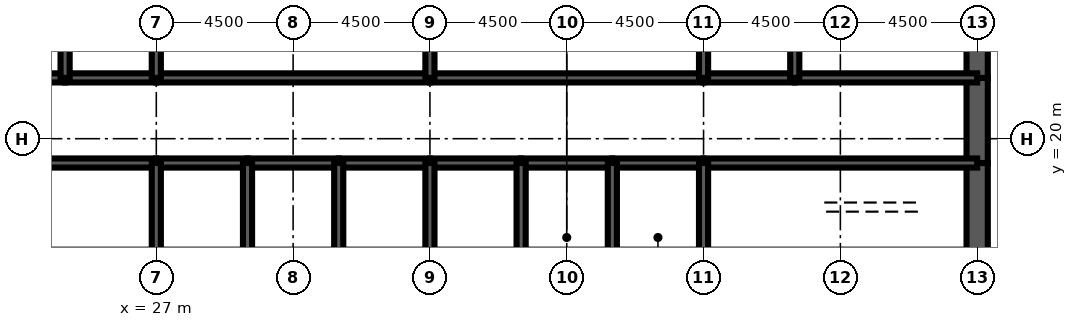
"""IFC4 building model, lengths in metres.
Left out: names, types, materials, properties, quantities, classifications, styles, units other than length and angle.
Written with IfcOpenShell. Run it as: python <this file> out.ifc"""

import sys

from ifc_helpers import new_model, si_unit, direction, frame, frame_2d, origin, place, context, subcontext, project, spatial, rectangle, extrude, element, fill, save


model = new_model("IFC4")
c1 = context("Model", 3, precision=1e-05, world=origin(), true_north=direction((0.0, 1.0)))
c2 = subcontext(c1, "Body", "Model", "MODEL_VIEW")
j1 = project(units=[si_unit("LENGTHUNIT", "METRE"), si_unit("PLANEANGLEUNIT", "RADIAN")], contexts=[c1])
p1 = place(None, origin())
s1 = spatial("IfcSite", under=j1, at=p1, CompositionType="ELEMENT")
p2 = place(p1, origin())
s2 = spatial("IfcBuilding", under=s1, at=p2, CompositionType="ELEMENT")
p3 = place(p2, frame((0.0, 0.0, 321.5)))
s3 = spatial("IfcBuildingStorey", under=s2, at=p3, CompositionType="ELEMENT", Elevation=321.5)
p4 = place(p3, frame((54.0, 16.0, 0.0), z_axis=(0.0, 0.0, 1.0), x_axis=(0.0, 1.0, 0.0)))
e1 = element("IfcWall", 1, at=p4, inside=s3, PredefinedType="SHEAR", context=c2, shape_type="SweptSolid", body=[
    extrude(rectangle(XDim=3.2, YDim=0.7, at=frame_2d((1.6, 0.0))), origin(), (0.0, 0.0, 1.0), 4.2),
])
p5 = place(p3, frame((54.0, 19.2, 0.0), z_axis=(0.0, 0.0, 1.0), x_axis=(0.0, 1.0, 0.0)))
e2 = element("IfcWall", 2, at=p5, inside=s3, PredefinedType="SHEAR", context=c2, shape_type="SweptSolid", body=[
    extrude(rectangle(XDim=2.8, YDim=0.7, at=frame_2d((1.4, 0.0))), origin(), (0.0, 0.0, 1.0), 4.2),
])
p6 = place(p5, frame((0.4, 0.0, 0.0)))
e3 = element("IfcOpeningElement", 3, at=p6, cuts=e2, PredefinedType="OPENING", context=c2, shape_type="SweptSolid", body=[
    extrude(rectangle(XDim=1.8, YDim=2.1, at=frame_2d((0.9, 1.05))), frame((0.0, 0.36, 0.0), z_axis=(0.0, -1.0, 0.0), x_axis=(1.0, 0.0, 0.0)), (0.0, 0.0, 1.0), 0.72),
])
p7 = place(p3, frame((54.0, 22.0, 0.0), z_axis=(0.0, 0.0, 1.0), x_axis=(0.0, 1.0, 0.0)))
e4 = element("IfcWall", 4, at=p7, inside=s3, PredefinedType="SHEAR", context=c2, shape_type="SweptSolid", body=[
    extrude(rectangle(XDim=4.0, YDim=0.7, at=frame_2d((2.0, 0.0))), origin(), (0.0, 0.0, 1.0), 4.2),
])
p8 = place(p3, frame((18.0, 19.2, 0.0), z_axis=(0.0, 0.0, 1.0), x_axis=(1.0, 0.0, 0.0)))
e5 = element("IfcWall", 5, at=p8, inside=s3, PredefinedType="SOLIDWALL", context=c2, shape_type="SweptSolid", body=[
    extrude(rectangle(XDim=9.0, YDim=0.3, at=frame_2d((4.5, 0.0))), origin(), (0.0, 0.0, 1.0), 4.2),
])
p9 = place(p8, frame((0.65, 0.0, 0.0)))
e6 = element("IfcOpeningElement", 6, at=p9, cuts=e5, PredefinedType="OPENING", context=c2, shape_type="SweptSolid", body=[
    extrude(rectangle(XDim=1.0, YDim=2.1, at=frame_2d((0.5, 1.05))), frame((0.0, 0.16, 0.0), z_axis=(0.0, -1.0, 0.0), x_axis=(1.0, 0.0, 0.0)), (0.0, 0.0, 1.0), 0.32),
])
p10 = place(p3, frame((27.0, 19.2, 0.0), z_axis=(0.0, 0.0, 1.0), x_axis=(1.0, 0.0, 0.0)))
e7 = element("IfcWall", 7, at=p10, inside=s3, PredefinedType="SOLIDWALL", context=c2, shape_type="SweptSolid", body=[
    extrude(rectangle(XDim=3.0, YDim=0.3, at=frame_2d((1.5, 0.0))), origin(), (0.0, 0.0, 1.0), 4.2),
])
p11 = place(p10, frame((0.95, 0.0, 0.0)))
e8 = element("IfcOpeningElement", 8, at=p11, cuts=e7, PredefinedType="OPENING", context=c2, shape_type="SweptSolid", body=[
    extrude(rectangle(XDim=1.1, YDim=2.2, at=frame_2d((0.55, 1.1))), frame((0.0, 0.16, 0.0), z_axis=(0.0, -1.0, 0.0), x_axis=(1.0, 0.0, 0.0)), (0.0, 0.0, 1.0), 0.32),
])
p12 = place(p3, frame((30.0, 19.2, 0.0), z_axis=(0.0, 0.0, 1.0), x_axis=(1.0, 0.0, 0.0)))
e9 = element("IfcWall", 9, at=p12, inside=s3, PredefinedType="SOLIDWALL", context=c2, shape_type="SweptSolid", body=[
    extrude(rectangle(XDim=3.0, YDim=0.3, at=frame_2d((1.5, 0.0))), origin(), (0.0, 0.0, 1.0), 4.2),
])
p13 = place(p12, frame((0.95, 0.0, 0.0)))
e10 = element("IfcOpeningElement", 10, at=p13, cuts=e9, PredefinedType="OPENING", context=c2, shape_type="SweptSolid", body=[
    extrude(rectangle(XDim=1.1, YDim=2.2, at=frame_2d((0.55, 1.1))), frame((0.0, 0.16, 0.0), z_axis=(0.0, -1.0, 0.0), x_axis=(1.0, 0.0, 0.0)), (0.0, 0.0, 1.0), 0.32),
])
p14 = place(p3, frame((33.0, 19.2, 0.0), z_axis=(0.0, 0.0, 1.0), x_axis=(1.0, 0.0, 0.0)))
e11 = element("IfcWall", 11, at=p14, inside=s3, PredefinedType="SOLIDWALL", context=c2, shape_type="SweptSolid", body=[
    extrude(rectangle(XDim=3.0, YDim=0.3, at=frame_2d((1.5, 0.0))), origin(), (0.0, 0.0, 1.0), 4.2),
])
p15 = place(p14, frame((0.95, 0.0, 0.0)))
e12 = element("IfcOpeningElement", 12, at=p15, cuts=e11, PredefinedType="OPENING", context=c2, shape_type="SweptSolid", body=[
    extrude(rectangle(XDim=1.1, YDim=2.2, at=frame_2d((0.55, 1.1))), frame((0.0, 0.16, 0.0), z_axis=(0.0, -1.0, 0.0), x_axis=(1.0, 0.0, 0.0)), (0.0, 0.0, 1.0), 0.32),
])
p16 = place(p3, frame((36.0, 19.2, 0.0), z_axis=(0.0, 0.0, 1.0), x_axis=(1.0, 0.0, 0.0)))
e13 = element("IfcWall", 13, at=p16, inside=s3, PredefinedType="SOLIDWALL", context=c2, shape_type="SweptSolid", body=[
    extrude(rectangle(XDim=3.0, YDim=0.3, at=frame_2d((1.5, 0.0))), origin(), (0.0, 0.0, 1.0), 4.2),
])
p17 = place(p16, frame((0.95, 0.0, 0.0)))
e14 = element("IfcOpeningElement", 14, at=p17, cuts=e13, PredefinedType="OPENING", context=c2, shape_type="SweptSolid", body=[
    extrude(rectangle(XDim=1.1, YDim=2.2, at=frame_2d((0.55, 1.1))), frame((0.0, 0.16, 0.0), z_axis=(0.0, -1.0, 0.0), x_axis=(1.0, 0.0, 0.0)), (0.0, 0.0, 1.0), 0.32),
])
p18 = place(p3, frame((39.0, 19.2, 0.0), z_axis=(0.0, 0.0, 1.0), x_axis=(1.0, 0.0, 0.0)))
e15 = element("IfcWall", 15, at=p18, inside=s3, PredefinedType="SOLIDWALL", context=c2, shape_type="SweptSolid", body=[
    extrude(rectangle(XDim=3.0, YDim=0.3, at=frame_2d((1.5, 0.0))), origin(), (0.0, 0.0, 1.0), 4.2),
])
p19 = place(p18, frame((1.0, 0.0, 0.0)))
e16 = element("IfcOpeningElement", 16, at=p19, cuts=e15, PredefinedType="OPENING", context=c2, shape_type="SweptSolid", body=[
    extrude(rectangle(XDim=1.0, YDim=2.1, at=frame_2d((0.5, 1.05))), frame((0.0, 0.16, 0.0), z_axis=(0.0, -1.0, 0.0), x_axis=(1.0, 0.0, 0.0)), (0.0, 0.0, 1.0), 0.32),
])
p20 = place(p3, frame((42.0, 19.2, 0.0), z_axis=(0.0, 0.0, 1.0), x_axis=(1.0, 0.0, 0.0)))
e17 = element("IfcWall", 17, at=p20, inside=s3, PredefinedType="SOLIDWALL", context=c2, shape_type="SweptSolid", body=[
    extrude(rectangle(XDim=3.0, YDim=0.3, at=frame_2d((1.5, 0.0))), origin(), (0.0, 0.0, 1.0), 4.2),
])
p21 = place(p20, frame((1.0, 0.0, 0.0)))
e18 = element("IfcOpeningElement", 18, at=p21, cuts=e17, PredefinedType="OPENING", context=c2, shape_type="SweptSolid", body=[
    extrude(rectangle(XDim=1.0, YDim=2.1, at=frame_2d((0.5, 1.05))), frame((0.0, 0.16, 0.0), z_axis=(0.0, -1.0, 0.0), x_axis=(1.0, 0.0, 0.0)), (0.0, 0.0, 1.0), 0.32),
])
p22 = place(p3, frame((45.0, 19.2, 0.0), z_axis=(0.0, 0.0, 1.0), x_axis=(1.0, 0.0, 0.0)))
e19 = element("IfcWall", 19, at=p22, inside=s3, PredefinedType="SOLIDWALL", context=c2, shape_type="SweptSolid", body=[
    extrude(rectangle(XDim=9.0, YDim=0.3, at=frame_2d((4.5, 0.0))), origin(), (0.0, 0.0, 1.0), 4.2),
])
p23 = place(p22, frame((7.35, 0.0, 0.0)))
e20 = element("IfcOpeningElement", 20, at=p23, cuts=e19, PredefinedType="OPENING", context=c2, shape_type="SweptSolid", body=[
    extrude(rectangle(XDim=1.0, YDim=2.1, at=frame_2d((0.5, 1.05))), frame((0.0, 0.16, 0.0), z_axis=(0.0, -1.0, 0.0), x_axis=(1.0, 0.0, 0.0)), (0.0, 0.0, 1.0), 0.32),
])
p24 = place(p3, frame((18.0, 22.0, 0.0), z_axis=(0.0, 0.0, 1.0), x_axis=(1.0, 0.0, 0.0)))
e21 = element("IfcWall", 21, at=p24, inside=s3, PredefinedType="SOLIDWALL", context=c2, shape_type="SweptSolid", body=[
    extrude(rectangle(XDim=6.0, YDim=0.3, at=frame_2d((3.0, 0.0))), origin(), (0.0, 0.0, 1.0), 4.2),
])
p25 = place(p24, frame((2.0, 0.0, 0.0)))
e22 = element("IfcOpeningElement", 22, at=p25, cuts=e21, PredefinedType="OPENING", context=c2, shape_type="SweptSolid", body=[
    extrude(rectangle(XDim=1.0, YDim=2.1, at=frame_2d((0.5, 1.05))), frame((0.0, 0.16, 0.0), z_axis=(0.0, -1.0, 0.0), x_axis=(1.0, 0.0, 0.0)), (0.0, 0.0, 1.0), 0.32),
])
p26 = place(p3, frame((24.0, 22.0, 0.0), z_axis=(0.0, 0.0, 1.0), x_axis=(1.0, 0.0, 0.0)))
e23 = element("IfcWall", 23, at=p26, inside=s3, PredefinedType="SOLIDWALL", context=c2, shape_type="SweptSolid", body=[
    extrude(rectangle(XDim=3.0, YDim=0.3, at=frame_2d((1.5, 0.0))), origin(), (0.0, 0.0, 1.0), 4.2),
])
p27 = place(p26, frame((1.0, 0.0, 0.0)))
e24 = element("IfcOpeningElement", 24, at=p27, cuts=e23, PredefinedType="OPENING", context=c2, shape_type="SweptSolid", body=[
    extrude(rectangle(XDim=1.0, YDim=2.1, at=frame_2d((0.5, 1.05))), frame((0.0, 0.16, 0.0), z_axis=(0.0, -1.0, 0.0), x_axis=(1.0, 0.0, 0.0)), (0.0, 0.0, 1.0), 0.32),
])
p28 = place(p3, frame((27.0, 22.0, 0.0), z_axis=(0.0, 0.0, 1.0), x_axis=(1.0, 0.0, 0.0)))
e25 = element("IfcWall", 25, at=p28, inside=s3, PredefinedType="SOLIDWALL", context=c2, shape_type="SweptSolid", body=[
    extrude(rectangle(XDim=9.0, YDim=0.3, at=frame_2d((4.5, 0.0))), origin(), (0.0, 0.0, 1.0), 4.2),
])
p29 = place(p28, frame((4.0, 0.0, 0.0)))
e26 = element("IfcOpeningElement", 26, at=p29, cuts=e25, PredefinedType="OPENING", context=c2, shape_type="SweptSolid", body=[
    extrude(rectangle(XDim=1.0, YDim=2.1, at=frame_2d((0.5, 1.05))), frame((0.0, 0.16, 0.0), z_axis=(0.0, -1.0, 0.0), x_axis=(1.0, 0.0, 0.0)), (0.0, 0.0, 1.0), 0.32),
])
p30 = place(p3, frame((36.0, 22.0, 0.0), z_axis=(0.0, 0.0, 1.0), x_axis=(1.0, 0.0, 0.0)))
e27 = element("IfcWall", 27, at=p30, inside=s3, PredefinedType="SOLIDWALL", context=c2, shape_type="SweptSolid", body=[
    extrude(rectangle(XDim=9.0, YDim=0.3, at=frame_2d((4.5, 0.0))), origin(), (0.0, 0.0, 1.0), 4.2),
])
p31 = place(p30, frame((4.0, 0.0, 0.0)))
e28 = element("IfcOpeningElement", 28, at=p31, cuts=e27, PredefinedType="OPENING", context=c2, shape_type="SweptSolid", body=[
    extrude(rectangle(XDim=1.0, YDim=2.1, at=frame_2d((0.5, 1.05))), frame((0.0, 0.16, 0.0), z_axis=(0.0, -1.0, 0.0), x_axis=(1.0, 0.0, 0.0)), (0.0, 0.0, 1.0), 0.32),
])
p32 = place(p3, frame((45.0, 22.0, 0.0), z_axis=(0.0, 0.0, 1.0), x_axis=(1.0, 0.0, 0.0)))
e29 = element("IfcWall", 29, at=p32, inside=s3, PredefinedType="SOLIDWALL", context=c2, shape_type="SweptSolid", body=[
    extrude(rectangle(XDim=3.0, YDim=0.3, at=frame_2d((1.5, 0.0))), origin(), (0.0, 0.0, 1.0), 4.2),
])
p33 = place(p32, frame((1.0, 0.0, 0.0)))
e30 = element("IfcOpeningElement", 30, at=p33, cuts=e29, PredefinedType="OPENING", context=c2, shape_type="SweptSolid", body=[
    extrude(rectangle(XDim=1.0, YDim=2.1, at=frame_2d((0.5, 1.05))), frame((0.0, 0.16, 0.0), z_axis=(0.0, -1.0, 0.0), x_axis=(1.0, 0.0, 0.0)), (0.0, 0.0, 1.0), 0.32),
])
p34 = place(p3, frame((48.0, 22.0, 0.0), z_axis=(0.0, 0.0, 1.0), x_axis=(1.0, 0.0, 0.0)))
e31 = element("IfcWall", 31, at=p34, inside=s3, PredefinedType="SOLIDWALL", context=c2, shape_type="SweptSolid", body=[
    extrude(rectangle(XDim=6.0, YDim=0.3, at=frame_2d((3.0, 0.0))), origin(), (0.0, 0.0, 1.0), 4.2),
])
p35 = place(p34, frame((2.0, 0.0, 0.0)))
e32 = element("IfcOpeningElement", 32, at=p35, cuts=e31, PredefinedType="OPENING", context=c2, shape_type="SweptSolid", body=[
    extrude(rectangle(XDim=1.0, YDim=2.1, at=frame_2d((0.5, 1.05))), frame((0.0, 0.16, 0.0), z_axis=(0.0, -1.0, 0.0), x_axis=(1.0, 0.0, 0.0)), (0.0, 0.0, 1.0), 0.32),
])
p36 = place(p34, frame((4.1, 0.0, 0.0)))
e33 = element("IfcOpeningElement", 33, at=p36, cuts=e31, PredefinedType="OPENING", context=c2, shape_type="SweptSolid", body=[
    extrude(rectangle(XDim=1.0, YDim=2.1, at=frame_2d((0.5, 1.05))), frame((0.0, 0.16, 0.0), z_axis=(0.0, -1.0, 0.0), x_axis=(1.0, 0.0, 0.0)), (0.0, 0.0, 1.0), 0.32),
])
for number, where, z_axis, x_axis in (
    (34, (27.0, 16.0, 0.0), (0.0, 0.0, 1.0), (0.0, 1.0, 0.0)),
    (35, (30.0, 16.0, 0.0), (0.0, 0.0, 1.0), (0.0, 1.0, 0.0)),
    (36, (33.0, 16.0, 0.0), (0.0, 0.0, 1.0), (0.0, 1.0, 0.0)),
    (37, (36.0, 16.0, 0.0), (0.0, 0.0, 1.0), (0.0, 1.0, 0.0)),
    (38, (39.0, 16.0, 0.0), (0.0, 0.0, 1.0), (0.0, 1.0, 0.0)),
    (39, (42.0, 16.0, 0.0), (0.0, 0.0, 1.0), (0.0, 1.0, 0.0)),
    (40, (45.0, 16.0, 0.0), (0.0, 0.0, 1.0), (0.0, 1.0, 0.0)),
):
    element("IfcWall", number, at=place(p3, frame(where, z_axis=z_axis, x_axis=x_axis)), inside=s3, PredefinedType="SOLIDWALL", context=c2, shape_type="SweptSolid", body=[
        extrude(rectangle(XDim=3.2, YDim=0.3, at=frame_2d((1.6, 0.0))), origin(), (0.0, 0.0, 1.0), 4.2),
    ])
for number, where, z_axis, x_axis in (
    (41, (24.0, 22.0, 0.0), (0.0, 0.0, 1.0), (0.0, 1.0, 0.0)),
    (42, (27.0, 22.0, 0.0), (0.0, 0.0, 1.0), (0.0, 1.0, 0.0)),
    (43, (36.0, 22.0, 0.0), (0.0, 0.0, 1.0), (0.0, 1.0, 0.0)),
    (44, (45.0, 22.0, 0.0), (0.0, 0.0, 1.0), (0.0, 1.0, 0.0)),
    (45, (48.0, 22.0, 0.0), (0.0, 0.0, 1.0), (0.0, 1.0, 0.0)),
):
    element("IfcWall", number, at=place(p3, frame(where, z_axis=z_axis, x_axis=x_axis)), inside=s3, PredefinedType="SOLIDWALL", context=c2, shape_type="SweptSolid", body=[
        extrude(rectangle(XDim=4.0, YDim=0.3, at=frame_2d((2.0, 0.0))), origin(), (0.0, 0.0, 1.0), 4.2),
    ])
p37 = place(p3, frame((39.15, 17.3, 0.0), z_axis=(0.0, 0.0, 1.0), x_axis=(1.0, 0.0, 0.0)))
e46 = element("IfcWall", 46, at=p37, inside=s3, PredefinedType="SOLIDWALL", context=c2, shape_type="SweptSolid", body=[
    extrude(rectangle(XDim=2.7, YDim=0.3, at=frame_2d((1.35, 0.0))), origin(), (0.0, 0.0, 1.0), 4.04),
])
p38 = place(p37, frame((0.85, 0.0, 0.0)))
e47 = element("IfcOpeningElement", 47, at=p38, cuts=e46, PredefinedType="OPENING", context=c2, shape_type="SweptSolid", body=[
    extrude(rectangle(XDim=1.0, YDim=2.1, at=frame_2d((0.5, 1.05))), frame((0.0, 0.16, 0.0), z_axis=(0.0, -1.0, 0.0), x_axis=(1.0, 0.0, 0.0)), (0.0, 0.0, 1.0), 0.32),
])
p39 = place(p3, frame((42.15, 17.3, 0.0), z_axis=(0.0, 0.0, 1.0), x_axis=(1.0, 0.0, 0.0)))
e48 = element("IfcWall", 48, at=p39, inside=s3, PredefinedType="SOLIDWALL", context=c2, shape_type="SweptSolid", body=[
    extrude(rectangle(XDim=2.7, YDim=0.3, at=frame_2d((1.35, 0.0))), origin(), (0.0, 0.0, 1.0), 4.04),
])
p40 = place(p39, frame((0.85, 0.0, 0.0)))
e49 = element("IfcOpeningElement", 49, at=p40, cuts=e48, PredefinedType="OPENING", context=c2, shape_type="SweptSolid", body=[
    extrude(rectangle(XDim=1.0, YDim=2.1, at=frame_2d((0.5, 1.05))), frame((0.0, 0.16, 0.0), z_axis=(0.0, -1.0, 0.0), x_axis=(1.0, 0.0, 0.0)), (0.0, 0.0, 1.0), 0.32),
])
p41 = place(p3, frame((38.5, 22.15, 0.0), z_axis=(0.0, 0.0, 1.0), x_axis=(0.0, 1.0, 0.0)))
e50 = element("IfcWall", 50, at=p41, inside=s3, PredefinedType="PARTITIONING", context=c2, shape_type="SweptSolid", body=[
    extrude(rectangle(XDim=3.7, YDim=0.15, at=frame_2d((1.85, 0.0))), origin(), (0.0, 0.0, 1.0), 3.0),
])
p42 = place(p41, frame((2.2, 0.0, 0.0)))
e51 = element("IfcOpeningElement", 51, at=p42, cuts=e50, PredefinedType="OPENING", context=c2, shape_type="SweptSolid", body=[
    extrude(rectangle(XDim=1.0, YDim=2.1, at=frame_2d((0.5, 1.05))), frame((0.0, 0.085, 0.0), z_axis=(0.0, -1.0, 0.0), x_axis=(1.0, 0.0, 0.0)), (0.0, 0.0, 1.0), 0.17),
])
p43 = place(p3, frame((51.475, 22.15, 0.0), z_axis=(0.0, 0.0, 1.0), x_axis=(0.0, 1.0, 0.0)))
e52 = element("IfcWall", 52, at=p43, inside=s3, PredefinedType="PARTITIONING", context=c2, shape_type="SweptSolid", body=[
    extrude(rectangle(XDim=3.7, YDim=0.15, at=frame_2d((1.85, 0.0))), origin(), (0.0, 0.0, 1.0), 3.0),
])
p44 = place(p3, frame((24.5, 19.35, 0.0), z_axis=(0.0, 0.0, 1.0), x_axis=(0.0, 1.0, 0.0)))
e53 = element("IfcWall", 53, at=p44, inside=s3, PredefinedType="PARTITIONING", context=c2, shape_type="SweptSolid", body=[
    extrude(rectangle(XDim=2.5, YDim=0.15, at=frame_2d((1.25, 0.0))), origin(), (0.0, 0.0, 1.0), 3.0),
])
p45 = place(p44, frame((1.15, 0.0, 0.0)))
e54 = element("IfcOpeningElement", 54, at=p45, cuts=e53, PredefinedType="OPENING", context=c2, shape_type="SweptSolid", body=[
    extrude(rectangle(XDim=1.0, YDim=2.1, at=frame_2d((0.5, 1.05))), frame((0.0, 0.085, 0.0), z_axis=(0.0, -1.0, 0.0), x_axis=(1.0, 0.0, 0.0)), (0.0, 0.0, 1.0), 0.17),
])
p46 = place(p38, origin())
e55 = element("IfcDoor", 55, at=p46, inside=s3, OperationType="SINGLE_SWING_LEFT", PredefinedType="DOOR", context=c2, shape_type="SweptSolid", body=[
    extrude(rectangle(XDim=1.0, YDim=2.1, at=frame_2d((0.5, 1.05))), frame((0.0, 0.025, 0.0), z_axis=(0.0, -1.0, 0.0), x_axis=(1.0, 0.0, 0.0)), (0.0, 0.0, 1.0), 0.05),
])
fill(e47, e55)
p47 = place(p40, origin())
e56 = element("IfcDoor", 56, at=p47, inside=s3, OperationType="SINGLE_SWING_LEFT", PredefinedType="DOOR", context=c2, shape_type="SweptSolid", body=[
    extrude(rectangle(XDim=1.0, YDim=2.1, at=frame_2d((0.5, 1.05))), frame((0.0, 0.025, 0.0), z_axis=(0.0, -1.0, 0.0), x_axis=(1.0, 0.0, 0.0)), (0.0, 0.0, 1.0), 0.05),
])
fill(e49, e56)
p48 = place(p45, origin())
e57 = element("IfcDoor", 57, at=p48, inside=s3, OperationType="SINGLE_SWING_RIGHT", PredefinedType="DOOR", context=c2, shape_type="SweptSolid", body=[
    extrude(rectangle(XDim=1.0, YDim=2.1, at=frame_2d((0.5, 1.05))), frame((0.0, 0.025, 0.0), z_axis=(0.0, -1.0, 0.0), x_axis=(1.0, 0.0, 0.0)), (0.0, 0.0, 1.0), 0.05),
])
fill(e54, e57)
p49 = place(p11, origin())
e58 = element("IfcDoor", 58, at=p49, inside=s3, OperationType="DOUBLE_DOOR_SLIDING", PredefinedType="USERDEFINED", context=c2, shape_type="SweptSolid", body=[
    extrude(rectangle(XDim=1.1, YDim=2.2, at=frame_2d((0.55, 1.1))), frame((0.0, 0.025, 0.0), z_axis=(0.0, -1.0, 0.0), x_axis=(1.0, 0.0, 0.0)), (0.0, 0.0, 1.0), 0.05),
])
fill(e8, e58)
p50 = place(p13, origin())
e59 = element("IfcDoor", 59, at=p50, inside=s3, OperationType="DOUBLE_DOOR_SLIDING", PredefinedType="USERDEFINED", context=c2, shape_type="SweptSolid", body=[
    extrude(rectangle(XDim=1.1, YDim=2.2, at=frame_2d((0.55, 1.1))), frame((0.0, 0.025, 0.0), z_axis=(0.0, -1.0, 0.0), x_axis=(1.0, 0.0, 0.0)), (0.0, 0.0, 1.0), 0.05),
])
fill(e10, e59)
p51 = place(p15, origin())
e60 = element("IfcDoor", 60, at=p51, inside=s3, OperationType="DOUBLE_DOOR_SLIDING", PredefinedType="USERDEFINED", context=c2, shape_type="SweptSolid", body=[
    extrude(rectangle(XDim=1.1, YDim=2.2, at=frame_2d((0.55, 1.1))), frame((0.0, 0.025, 0.0), z_axis=(0.0, -1.0, 0.0), x_axis=(1.0, 0.0, 0.0)), (0.0, 0.0, 1.0), 0.05),
])
fill(e12, e60)
p52 = place(p17, origin())
e61 = element("IfcDoor", 61, at=p52, inside=s3, OperationType="DOUBLE_DOOR_SLIDING", PredefinedType="USERDEFINED", context=c2, shape_type="SweptSolid", body=[
    extrude(rectangle(XDim=1.1, YDim=2.2, at=frame_2d((0.55, 1.1))), frame((0.0, 0.025, 0.0), z_axis=(0.0, -1.0, 0.0), x_axis=(1.0, 0.0, 0.0)), (0.0, 0.0, 1.0), 0.05),
])
fill(e14, e61)
p53 = place(p23, origin())
e62 = element("IfcDoor", 62, at=p53, inside=s3, OperationType="SINGLE_SWING_RIGHT", PredefinedType="DOOR", context=c2, shape_type="SweptSolid", body=[
    extrude(rectangle(XDim=1.0, YDim=2.1, at=frame_2d((0.5, 1.05))), frame((0.0, 0.025, 0.0), z_axis=(0.0, -1.0, 0.0), x_axis=(1.0, 0.0, 0.0)), (0.0, 0.0, 1.0), 0.05),
])
fill(e20, e62)
p54 = place(p6, origin())
e63 = element("IfcDoor", 63, at=p54, inside=s3, OperationType="SINGLE_SWING_LEFT", PredefinedType="DOOR", context=c2, shape_type="SweptSolid", body=[
    extrude(rectangle(XDim=1.8, YDim=2.1, at=frame_2d((0.9, 1.05))), frame((0.0, 0.35, 0.0), z_axis=(0.0, -1.0, 0.0), x_axis=(1.0, 0.0, 0.0)), (0.0, 0.0, 1.0), 0.699),
])
fill(e3, e63)
p55 = place(p27, origin())
e64 = element("IfcDoor", 64, at=p55, inside=s3, OperationType="SINGLE_SWING_LEFT", PredefinedType="DOOR", context=c2, shape_type="SweptSolid", body=[
    extrude(rectangle(XDim=1.0, YDim=2.1, at=frame_2d((0.5, 1.05))), frame((0.0, 0.025, 0.0), z_axis=(0.0, -1.0, 0.0), x_axis=(1.0, 0.0, 0.0)), (0.0, 0.0, 1.0), 0.05),
])
fill(e24, e64)
p56 = place(p29, origin())
e65 = element("IfcDoor", 65, at=p56, inside=s3, OperationType="SINGLE_SWING_LEFT", PredefinedType="DOOR", context=c2, shape_type="SweptSolid", body=[
    extrude(rectangle(XDim=1.0, YDim=2.1, at=frame_2d((0.5, 1.05))), frame((0.0, 0.025, 0.0), z_axis=(0.0, -1.0, 0.0), x_axis=(1.0, 0.0, 0.0)), (0.0, 0.0, 1.0), 0.05),
])
fill(e26, e65)
p57 = place(p31, origin())
e66 = element("IfcDoor", 66, at=p57, inside=s3, OperationType="SINGLE_SWING_LEFT", PredefinedType="DOOR", context=c2, shape_type="SweptSolid", body=[
    extrude(rectangle(XDim=1.0, YDim=2.1, at=frame_2d((0.5, 1.05))), frame((0.0, 0.025, 0.0), z_axis=(0.0, -1.0, 0.0), x_axis=(1.0, 0.0, 0.0)), (0.0, 0.0, 1.0), 0.05),
])
fill(e28, e66)
p58 = place(p33, origin())
e67 = element("IfcDoor", 67, at=p58, inside=s3, OperationType="SINGLE_SWING_LEFT", PredefinedType="DOOR", context=c2, shape_type="SweptSolid", body=[
    extrude(rectangle(XDim=1.0, YDim=2.1, at=frame_2d((0.5, 1.05))), frame((0.0, 0.025, 0.0), z_axis=(0.0, -1.0, 0.0), x_axis=(1.0, 0.0, 0.0)), (0.0, 0.0, 1.0), 0.05),
])
fill(e30, e67)
p59 = place(p35, origin())
e68 = element("IfcDoor", 68, at=p59, inside=s3, OperationType="SINGLE_SWING_LEFT", PredefinedType="DOOR", context=c2, shape_type="SweptSolid", body=[
    extrude(rectangle(XDim=1.0, YDim=2.1, at=frame_2d((0.5, 1.05))), frame((0.0, 0.025, 0.0), z_axis=(0.0, -1.0, 0.0), x_axis=(1.0, 0.0, 0.0)), (0.0, 0.0, 1.0), 0.05),
])
fill(e32, e68)
p60 = place(p36, origin())
e69 = element("IfcDoor", 69, at=p60, inside=s3, OperationType="SINGLE_SWING_RIGHT", PredefinedType="DOOR", context=c2, shape_type="SweptSolid", body=[
    extrude(rectangle(XDim=1.0, YDim=2.1, at=frame_2d((0.5, 1.05))), frame((0.0, 0.025, 0.0), z_axis=(0.0, -1.0, 0.0), x_axis=(1.0, 0.0, 0.0)), (0.0, 0.0, 1.0), 0.05),
])
fill(e33, e69)
p61 = place(p19, origin())
e70 = element("IfcDoor", 70, at=p61, inside=s3, OperationType="SINGLE_SWING_LEFT", PredefinedType="DOOR", context=c2, shape_type="SweptSolid", body=[
    extrude(rectangle(XDim=1.0, YDim=2.1, at=frame_2d((0.5, 1.05))), frame((0.0, 0.025, 0.0), z_axis=(0.0, -1.0, 0.0), x_axis=(1.0, 0.0, 0.0)), (0.0, 0.0, 1.0), 0.05),
])
fill(e16, e70)
p62 = place(p21, origin())
e71 = element("IfcDoor", 71, at=p62, inside=s3, OperationType="SINGLE_SWING_LEFT", PredefinedType="DOOR", context=c2, shape_type="SweptSolid", body=[
    extrude(rectangle(XDim=1.0, YDim=2.1, at=frame_2d((0.5, 1.05))), frame((0.0, 0.025, 0.0), z_axis=(0.0, -1.0, 0.0), x_axis=(1.0, 0.0, 0.0)), (0.0, 0.0, 1.0), 0.05),
])
fill(e18, e71)
save(model, sys.argv[1])
